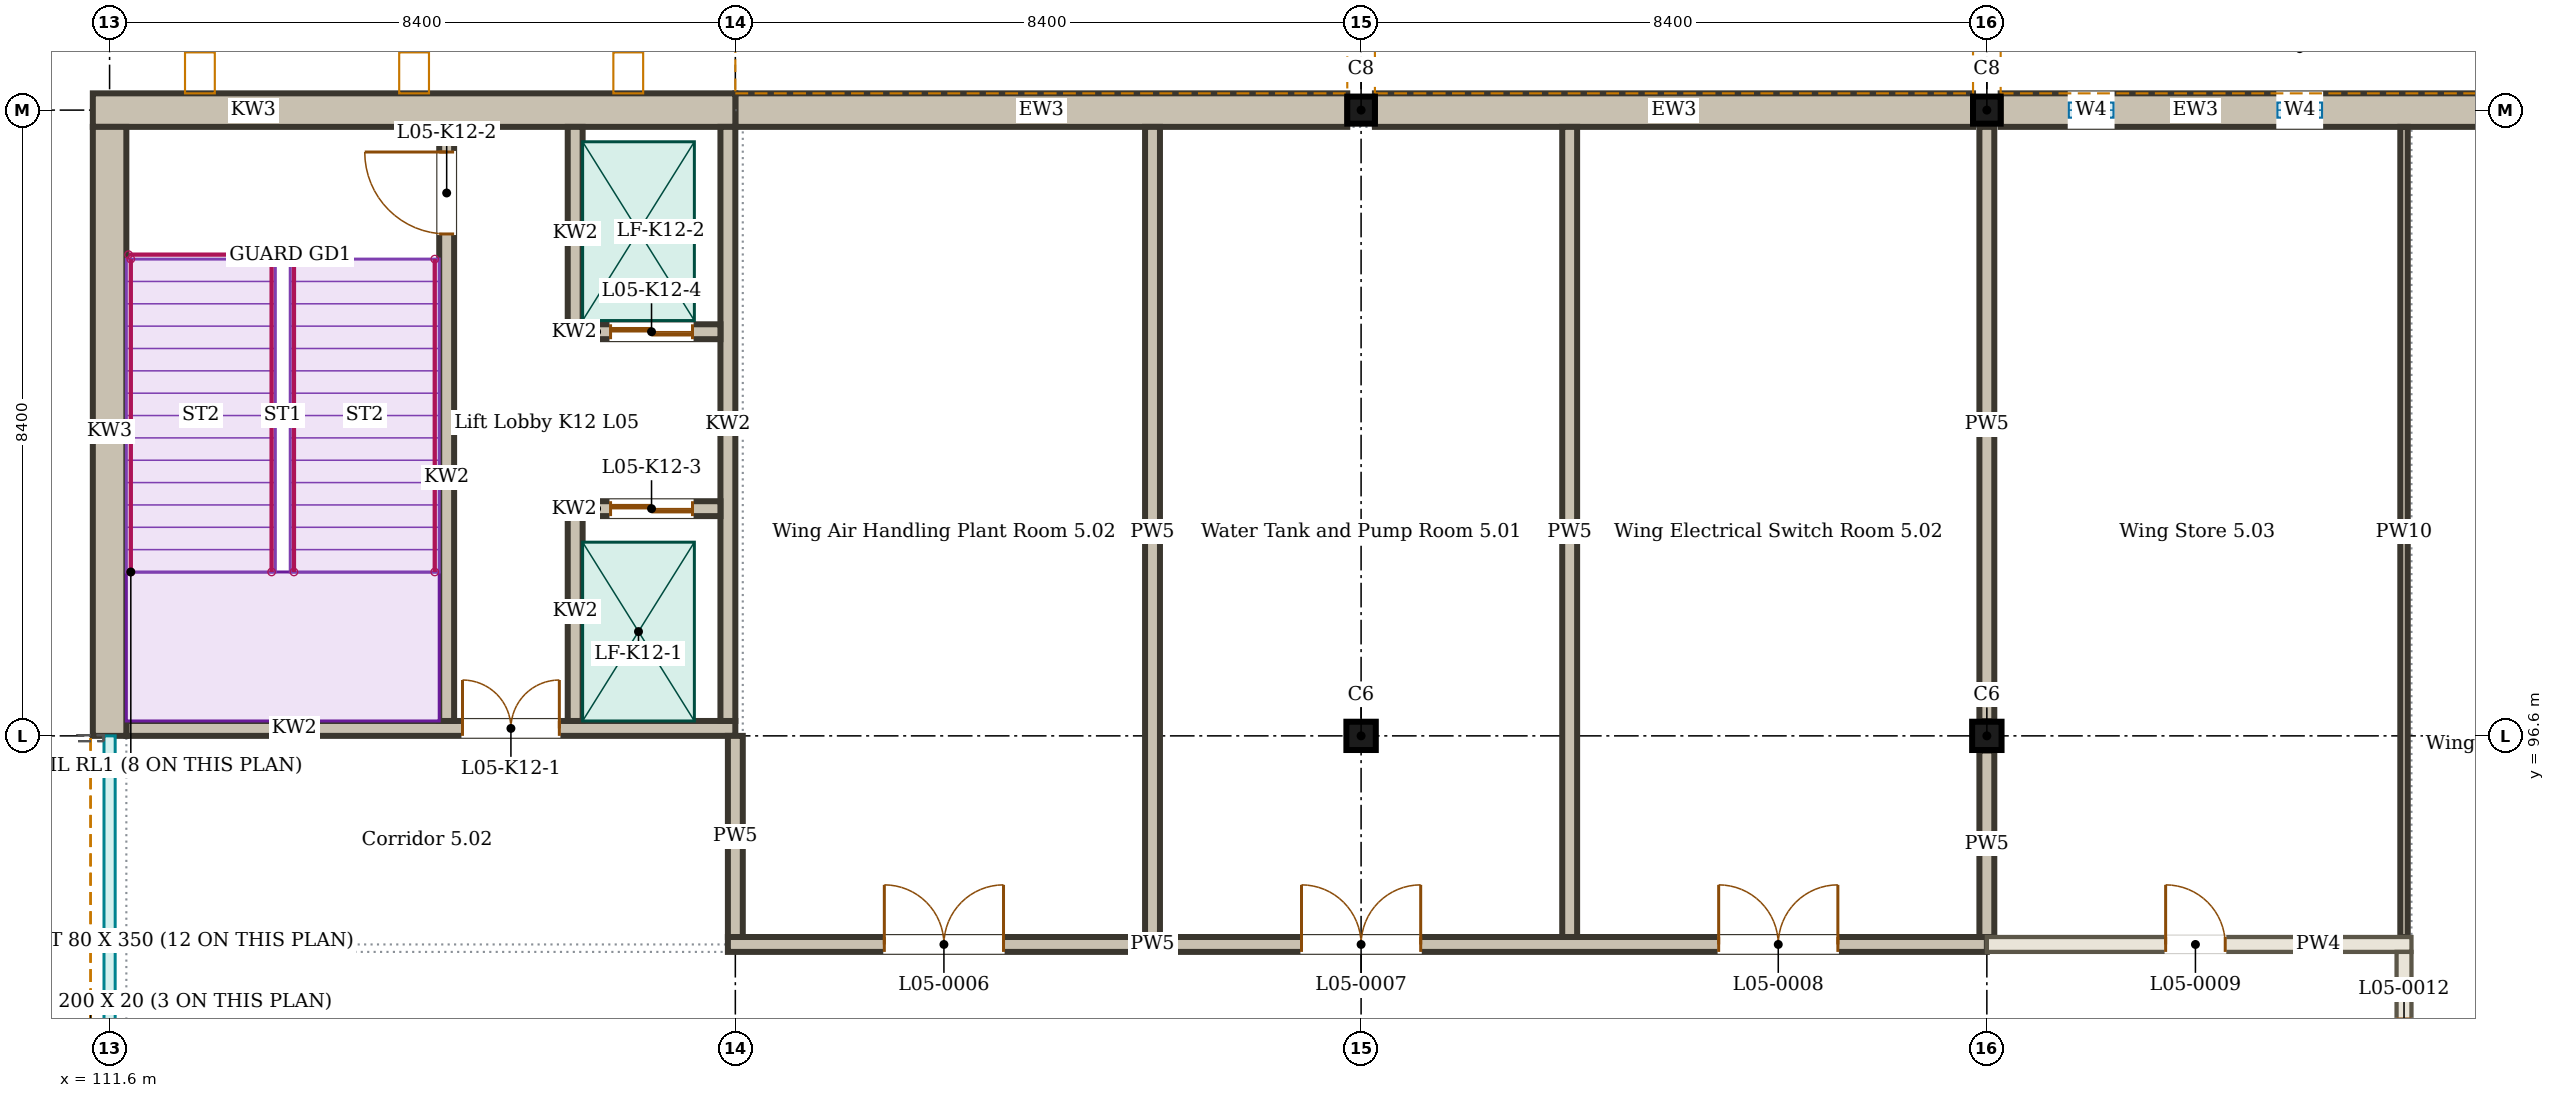
"""IFC4 building model, lengths in metres.
Left out: names, types, materials, properties, quantities, classifications, styles, units other than length and angle.
Written with IfcOpenShell. Run it as: python <this file> out.ifc"""

import sys

from ifc_helpers import new_model, si_unit, direction, frame, frame_2d, origin, origin_2d, place, context, subcontext, project, spatial, rectangle, i_section, extrude, element, fill, save


model = new_model("IFC4")
c1 = context("Model", 3, precision=1e-05, world=origin(), true_north=direction((0.0, 1.0)))
c2 = subcontext(c1, "Body", "Model", "MODEL_VIEW")
j1 = project(units=[si_unit("LENGTHUNIT", "METRE"), si_unit("PLANEANGLEUNIT", "RADIAN")], contexts=[c1])
p1 = place(None, origin())
s1 = spatial("IfcSite", under=j1, at=p1, CompositionType="ELEMENT")
p2 = place(p1, origin())
s2 = spatial("IfcBuilding", under=s1, at=p2, CompositionType="ELEMENT")
p3 = place(p2, frame((0.0, 0.0, 22.5)))
s3 = spatial("IfcBuildingStorey", under=s2, at=p3, CompositionType="ELEMENT", Elevation=22.5)
for number, where, z_axis, x_axis in (
    (1, (128.4, 96.6, 0.0), (0.0, 0.0, 1.0), (1.0, 0.0, 0.0)),
    (2, (136.8, 96.6, 0.0), (0.0, 0.0, 1.0), (1.0, 0.0, 0.0)),
):
    element("IfcColumn", number, at=place(p3, frame(where, z_axis=z_axis, x_axis=x_axis)), inside=s3, PredefinedType="COLUMN", context=c2, shape_type="SweptSolid", body=[
        extrude(i_section(OverallWidth=0.395, OverallDepth=0.38, WebThickness=0.019, FlangeThickness=0.03, FilletRadius=0.027, at=origin_2d()), origin(), (0.0, 0.0, 1.0), 4.5),
    ])
for number, where, z_axis, x_axis in (
    (3, (128.4, 105.0, 0.0), (0.0, 0.0, 1.0), (1.0, 0.0, 0.0)),
    (4, (136.8, 105.0, 0.0), (0.0, 0.0, 1.0), (1.0, 0.0, 0.0)),
):
    element("IfcColumn", number, at=place(p3, frame(where, z_axis=z_axis, x_axis=x_axis)), inside=s3, PredefinedType="COLUMN", context=c2, shape_type="SweptSolid", body=[
        extrude(i_section(OverallWidth=0.371, OverallDepth=0.364, WebThickness=0.013, FlangeThickness=0.022, FilletRadius=0.027, at=origin_2d()), origin(), (0.0, 0.0, 1.0), 4.5),
    ])
p4 = place(p3, frame((120.0, 105.0, 0.0), z_axis=(0.0, 0.0, 1.0), x_axis=(1.0, 0.0, 0.0)))
e5 = element("IfcWall", 5, at=p4, inside=s3, PredefinedType="SOLIDWALL", context=c2, shape_type="SweptSolid", body=[
    extrude(rectangle(XDim=8.215, YDim=0.45, at=frame_2d((4.107, 0.0))), origin(), (0.0, 0.0, 1.0), 3.85),
])
p5 = place(p3, frame((128.585, 105.0, 0.0), z_axis=(0.0, 0.0, 1.0), x_axis=(1.0, 0.0, 0.0)))
e6 = element("IfcWall", 6, at=p5, inside=s3, PredefinedType="SOLIDWALL", context=c2, shape_type="SweptSolid", body=[
    extrude(rectangle(XDim=8.029, YDim=0.45, at=frame_2d((4.015, 0.0))), origin(), (0.0, 0.0, 1.0), 3.85),
])
p6 = place(p3, frame((136.986, 105.0, 0.0), z_axis=(0.0, 0.0, 1.0), x_axis=(1.0, 0.0, 0.0)))
e7 = element("IfcWall", 7, at=p6, inside=s3, PredefinedType="SOLIDWALL", context=c2, shape_type="SweptSolid", body=[
    extrude(rectangle(XDim=8.029, YDim=0.45, at=frame_2d((4.014, 0.0))), origin(), (0.0, 0.0, 1.0), 3.85),
])
p7 = place(p6, frame((0.915, 0.0, 2.1)))
e8 = element("IfcOpeningElement", 8, at=p7, cuts=e7, PredefinedType="OPENING", context=c2, shape_type="SweptSolid", body=[
    extrude(rectangle(XDim=0.6, YDim=1.2, at=frame_2d((0.3, 0.6))), frame((0.0, 0.235, 0.0), z_axis=(0.0, -1.0, 0.0), x_axis=(1.0, 0.0, 0.0)), (0.0, 0.0, 1.0), 0.47),
])
p8 = place(p6, frame((3.715, 0.0, 2.1)))
e9 = element("IfcOpeningElement", 9, at=p8, cuts=e7, PredefinedType="OPENING", context=c2, shape_type="SweptSolid", body=[
    extrude(rectangle(XDim=0.6, YDim=1.2, at=frame_2d((0.3, 0.6))), frame((0.0, 0.235, 0.0), z_axis=(0.0, -1.0, 0.0), x_axis=(1.0, 0.0, 0.0)), (0.0, 0.0, 1.0), 0.47),
])
p9 = place(p6, frame((6.514, 0.0, 2.1)))
e10 = element("IfcOpeningElement", 10, at=p9, cuts=e7, PredefinedType="OPENING", context=c2, shape_type="SweptSolid", body=[
    extrude(rectangle(XDim=0.6, YDim=1.2, at=frame_2d((0.3, 0.6))), frame((0.0, 0.235, 0.0), z_axis=(0.0, -1.0, 0.0), x_axis=(1.0, 0.0, 0.0)), (0.0, 0.0, 1.0), 0.47),
])
p10 = place(p3, frame((119.9, 93.8, 0.0), z_axis=(0.0, 0.0, 1.0), x_axis=(1.0, 0.0, 0.0)))
e11 = element("IfcWall", 11, at=p10, inside=s3, PredefinedType="SOLIDWALL", context=c2, shape_type="SweptSolid", body=[
    extrude(rectangle(XDim=16.9, YDim=0.2, at=frame_2d((8.45, 0.0))), origin(), (0.0, 0.0, 1.0), 3.844),
])
p11 = place(p10, frame((2.1, 0.0, 0.0)))
e12 = element("IfcOpeningElement", 12, at=p11, cuts=e11, PredefinedType="OPENING", context=c2, shape_type="SweptSolid", body=[
    extrude(rectangle(XDim=1.6, YDim=2.1, at=frame_2d((0.8, 1.05))), frame((0.0, 0.11, 0.0), z_axis=(0.0, -1.0, 0.0), x_axis=(1.0, 0.0, 0.0)), (0.0, 0.0, 1.0), 0.22),
])
p12 = place(p10, frame((7.7, 0.0, 0.0)))
e13 = element("IfcOpeningElement", 13, at=p12, cuts=e11, PredefinedType="OPENING", context=c2, shape_type="SweptSolid", body=[
    extrude(rectangle(XDim=1.6, YDim=2.1, at=frame_2d((0.8, 1.05))), frame((0.0, 0.11, 0.0), z_axis=(0.0, -1.0, 0.0), x_axis=(1.0, 0.0, 0.0)), (0.0, 0.0, 1.0), 0.22),
])
p13 = place(p10, frame((13.3, 0.0, 0.0)))
e14 = element("IfcOpeningElement", 14, at=p13, cuts=e11, PredefinedType="OPENING", context=c2, shape_type="SweptSolid", body=[
    extrude(rectangle(XDim=1.6, YDim=2.1, at=frame_2d((0.8, 1.05))), frame((0.0, 0.11, 0.0), z_axis=(0.0, -1.0, 0.0), x_axis=(1.0, 0.0, 0.0)), (0.0, 0.0, 1.0), 0.22),
])
p14 = place(p3, frame((136.8, 93.8, 0.0), z_axis=(0.0, 0.0, 1.0), x_axis=(1.0, 0.0, 0.0)))
e15 = element("IfcWall", 15, at=p14, inside=s3, PredefinedType="PARTITIONING", context=c2, shape_type="SweptSolid", body=[
    extrude(rectangle(XDim=5.7, YDim=0.2, at=frame_2d((2.85, 0.0))), origin(), (0.0, 0.0, 1.0), 3.844),
])
p15 = place(p14, frame((2.4, 0.0, 0.0)))
e16 = element("IfcOpeningElement", 16, at=p15, cuts=e15, PredefinedType="OPENING", context=c2, shape_type="SweptSolid", body=[
    extrude(rectangle(XDim=0.8, YDim=2.1, at=frame_2d((0.4, 1.05))), frame((0.0, 0.11, 0.0), z_axis=(0.0, -1.0, 0.0), x_axis=(1.0, 0.0, 0.0)), (0.0, 0.0, 1.0), 0.22),
])
p16 = place(p3, frame((120.0, 93.9, 0.0), z_axis=(0.0, 0.0, 1.0), x_axis=(0.0, 1.0, 0.0)))
e17 = element("IfcWall", 17, at=p16, inside=s3, PredefinedType="SOLIDWALL", context=c2, shape_type="SweptSolid", body=[
    extrude(rectangle(XDim=2.7, YDim=0.2, at=frame_2d((1.35, 0.0))), origin(), (0.0, 0.0, 1.0), 3.844),
])
for number, where, z_axis, x_axis in (
    (18, (125.6, 93.9, 0.0), (0.0, 0.0, 1.0), (0.0, 1.0, 0.0)),
    (19, (131.2, 93.9, 0.0), (0.0, 0.0, 1.0), (0.0, 1.0, 0.0)),
):
    element("IfcWall", number, at=place(p3, frame(where, z_axis=z_axis, x_axis=x_axis)), inside=s3, PredefinedType="SOLIDWALL", context=c2, shape_type="SweptSolid", body=[
        extrude(rectangle(XDim=10.875, YDim=0.2, at=frame_2d((5.438, 0.0))), origin(), (0.0, 0.0, 1.0), 3.844),
    ])
p17 = place(p3, frame((136.8, 93.9, 0.0), z_axis=(0.0, 0.0, 1.0), x_axis=(0.0, 1.0, 0.0)))
e20 = element("IfcWall", 20, at=p17, inside=s3, PredefinedType="SOLIDWALL", context=c2, shape_type="SweptSolid", body=[
    extrude(rectangle(XDim=2.503, YDim=0.2, at=frame_2d((1.251, 0.0))), origin(), (0.0, 0.0, 1.0), 3.844),
])
p18 = place(p3, frame((136.8, 96.798, 0.0), z_axis=(0.0, 0.0, 1.0), x_axis=(0.0, 1.0, 0.0)))
e21 = element("IfcWall", 21, at=p18, inside=s3, PredefinedType="SOLIDWALL", context=c2, shape_type="SweptSolid", body=[
    extrude(rectangle(XDim=7.977, YDim=0.2, at=frame_2d((3.989, 0.0))), origin(), (0.0, 0.0, 1.0), 3.844),
])
p19 = place(p3, frame((142.4, 91.1, 0.0), z_axis=(0.0, 0.0, 1.0), x_axis=(0.0, 1.0, 0.0)))
e22 = element("IfcWall", 22, at=p19, inside=s3, PredefinedType="PARTITIONING", context=c2, shape_type="SweptSolid", body=[
    extrude(rectangle(XDim=2.6, YDim=0.2, at=frame_2d((1.3, 0.0))), origin(), (0.0, 0.0, 1.0), 3.936),
])
p20 = place(p19, frame((0.9, 0.0, 0.0)))
e23 = element("IfcOpeningElement", 23, at=p20, cuts=e22, PredefinedType="OPENING", context=c2, shape_type="SweptSolid", body=[
    extrude(rectangle(XDim=0.8, YDim=2.1, at=frame_2d((0.4, 1.05))), frame((0.0, 0.11, 0.0), z_axis=(0.0, -1.0, 0.0), x_axis=(1.0, 0.0, 0.0)), (0.0, 0.0, 1.0), 0.22),
])
p21 = place(p3, frame((142.4, 93.9, 0.0), z_axis=(0.0, 0.0, 1.0), x_axis=(0.0, 1.0, 0.0)))
e24 = element("IfcWall", 24, at=p21, inside=s3, PredefinedType="SOLIDWALL", context=c2, shape_type="SweptSolid", body=[
    extrude(rectangle(XDim=10.875, YDim=0.1, at=frame_2d((5.438, 0.0))), origin(), (0.0, 0.0, 1.0), 3.844),
])
p22 = place(p3, frame((111.825, 96.7, 0.0), z_axis=(0.0, 0.0, 1.0), x_axis=(1.0, 0.0, 0.0)))
e25 = element("IfcWall", 25, at=p22, inside=s3, PredefinedType="SOLIDWALL", context=c2, shape_type="SweptSolid", body=[
    extrude(rectangle(XDim=8.175, YDim=0.2, at=frame_2d((4.087, 0.0))), origin(), (0.0, 0.0, 1.0), 4.5),
])
p23 = place(p22, frame((4.512, 0.0, 0.0)))
e26 = element("IfcOpeningElement", 26, at=p23, cuts=e25, PredefinedType="OPENING", context=c2, shape_type="SweptSolid", body=[
    extrude(rectangle(XDim=1.3, YDim=2.1, at=frame_2d((0.65, 1.05))), frame((0.0, 0.11, 0.0), z_axis=(0.0, -1.0, 0.0), x_axis=(1.0, 0.0, 0.0)), (0.0, 0.0, 1.0), 0.22),
])
p24 = place(p3, frame((111.375, 105.0, 0.0), z_axis=(0.0, 0.0, 1.0), x_axis=(1.0, 0.0, 0.0)))
e27 = element("IfcWall", 27, at=p24, inside=s3, PredefinedType="SOLIDWALL", context=c2, shape_type="SweptSolid", body=[
    extrude(rectangle(XDim=8.625, YDim=0.45, at=frame_2d((4.312, 0.0))), origin(), (0.0, 0.0, 1.0), 4.5),
])
p25 = place(p3, frame((111.6, 96.6, 0.0), z_axis=(0.0, 0.0, 1.0), x_axis=(0.0, 1.0, 0.0)))
e28 = element("IfcWall", 28, at=p25, inside=s3, PredefinedType="SOLIDWALL", context=c2, shape_type="SweptSolid", body=[
    extrude(rectangle(XDim=8.175, YDim=0.45, at=frame_2d((4.087, 0.0))), origin(), (0.0, 0.0, 1.0), 4.5),
])
p26 = place(p3, frame((119.9, 96.8, 0.0), z_axis=(0.0, 0.0, 1.0), x_axis=(0.0, 1.0, 0.0)))
e29 = element("IfcWall", 29, at=p26, inside=s3, PredefinedType="SOLIDWALL", context=c2, shape_type="SweptSolid", body=[
    extrude(rectangle(XDim=7.975, YDim=0.2, at=frame_2d((3.987, 0.0))), origin(), (0.0, 0.0, 1.0), 4.5),
])
p27 = place(p3, frame((116.125, 96.8, 0.0), z_axis=(0.0, 0.0, 1.0), x_axis=(0.0, 1.0, 0.0)))
e30 = element("IfcWall", 30, at=p27, inside=s3, PredefinedType="SOLIDWALL", context=c2, shape_type="SweptSolid", body=[
    extrude(rectangle(XDim=7.975, YDim=0.2, at=frame_2d((3.987, 0.0))), origin(), (0.0, 0.0, 1.0), 4.5),
])
p28 = place(p27, frame((6.538, 0.0, 0.0)))
e31 = element("IfcOpeningElement", 31, at=p28, cuts=e30, PredefinedType="OPENING", context=c2, shape_type="SweptSolid", body=[
    extrude(rectangle(XDim=1.1, YDim=2.1, at=frame_2d((0.55, 1.05))), frame((0.0, 0.11, 0.0), z_axis=(0.0, -1.0, 0.0), x_axis=(1.0, 0.0, 0.0)), (0.0, 0.0, 1.0), 0.22),
])
p29 = place(p3, frame((117.85, 96.8, 0.0), z_axis=(0.0, 0.0, 1.0), x_axis=(0.0, 1.0, 0.0)))
e32 = element("IfcWall", 32, at=p29, inside=s3, PredefinedType="SOLIDWALL", context=c2, shape_type="SweptSolid", body=[
    extrude(rectangle(XDim=2.95, YDim=0.2, at=frame_2d((1.475, 0.0))), origin(), (0.0, 0.0, 1.0), 4.5),
])
p30 = place(p3, frame((117.85, 101.925, 0.0), z_axis=(0.0, 0.0, 1.0), x_axis=(0.0, 1.0, 0.0)))
e33 = element("IfcWall", 33, at=p30, inside=s3, PredefinedType="SOLIDWALL", context=c2, shape_type="SweptSolid", body=[
    extrude(rectangle(XDim=2.85, YDim=0.2, at=frame_2d((1.425, 0.0))), origin(), (0.0, 0.0, 1.0), 4.5),
])
p31 = place(p3, frame((117.95, 99.65, 0.0), z_axis=(0.0, 0.0, 1.0), x_axis=(1.0, 0.0, 0.0)))
e34 = element("IfcWall", 34, at=p31, inside=s3, PredefinedType="SOLIDWALL", context=c2, shape_type="SweptSolid", body=[
    extrude(rectangle(XDim=1.85, YDim=0.2, at=frame_2d((0.925, 0.0))), origin(), (0.0, 0.0, 1.0), 4.5),
])
p32 = place(p31, frame((0.375, 0.0, 0.0)))
e35 = element("IfcOpeningElement", 35, at=p32, cuts=e34, PredefinedType="OPENING", context=c2, shape_type="SweptSolid", body=[
    extrude(rectangle(XDim=1.1, YDim=2.1, at=frame_2d((0.55, 1.05))), frame((0.0, 0.11, 0.0), z_axis=(0.0, -1.0, 0.0), x_axis=(1.0, 0.0, 0.0)), (0.0, 0.0, 1.0), 0.22),
])
p33 = place(p3, frame((117.95, 102.025, 0.0), z_axis=(0.0, 0.0, 1.0), x_axis=(1.0, 0.0, 0.0)))
e36 = element("IfcWall", 36, at=p33, inside=s3, PredefinedType="SOLIDWALL", context=c2, shape_type="SweptSolid", body=[
    extrude(rectangle(XDim=1.85, YDim=0.2, at=frame_2d((0.925, 0.0))), origin(), (0.0, 0.0, 1.0), 4.5),
])
p34 = place(p33, frame((0.375, 0.0, 0.0)))
e37 = element("IfcOpeningElement", 37, at=p34, cuts=e36, PredefinedType="OPENING", context=c2, shape_type="SweptSolid", body=[
    extrude(rectangle(XDim=1.1, YDim=2.1, at=frame_2d((0.55, 1.05))), frame((0.0, 0.11, 0.0), z_axis=(0.0, -1.0, 0.0), x_axis=(1.0, 0.0, 0.0)), (0.0, 0.0, 1.0), 0.22),
])
p35 = place(p7, origin())
e38 = element("IfcWindow", 38, at=p35, inside=s3, PartitioningType="SINGLE_PANEL", PredefinedType="WINDOW", context=c2, shape_type="SweptSolid", body=[
    extrude(rectangle(XDim=0.6, YDim=1.2, at=frame_2d((0.3, 0.6))), frame((0.0, -0.075, 0.0), z_axis=(0.0, -1.0, 0.0), x_axis=(1.0, 0.0, 0.0)), (0.0, 0.0, 1.0), 0.06),
])
fill(e8, e38)
p36 = place(p8, origin())
e39 = element("IfcWindow", 39, at=p36, inside=s3, PartitioningType="SINGLE_PANEL", PredefinedType="WINDOW", context=c2, shape_type="SweptSolid", body=[
    extrude(rectangle(XDim=0.6, YDim=1.2, at=frame_2d((0.3, 0.6))), frame((0.0, -0.075, 0.0), z_axis=(0.0, -1.0, 0.0), x_axis=(1.0, 0.0, 0.0)), (0.0, 0.0, 1.0), 0.06),
])
fill(e9, e39)
p37 = place(p11, origin())
e40 = element("IfcDoor", 40, at=p37, inside=s3, OperationType="DOUBLE_DOOR_SINGLE_SWING", PredefinedType="DOOR", context=c2, shape_type="SweptSolid", body=[
    extrude(rectangle(XDim=1.6, YDim=2.1, at=frame_2d((0.8, 1.05))), frame((0.0, 0.025, 0.0), z_axis=(0.0, -1.0, 0.0), x_axis=(1.0, 0.0, 0.0)), (0.0, 0.0, 1.0), 0.05),
])
fill(e12, e40)
p38 = place(p12, origin())
e41 = element("IfcDoor", 41, at=p38, inside=s3, OperationType="DOUBLE_DOOR_SINGLE_SWING", PredefinedType="DOOR", context=c2, shape_type="SweptSolid", body=[
    extrude(rectangle(XDim=1.6, YDim=2.1, at=frame_2d((0.8, 1.05))), frame((0.0, 0.025, 0.0), z_axis=(0.0, -1.0, 0.0), x_axis=(1.0, 0.0, 0.0)), (0.0, 0.0, 1.0), 0.05),
])
fill(e13, e41)
p39 = place(p13, origin())
e42 = element("IfcDoor", 42, at=p39, inside=s3, OperationType="DOUBLE_DOOR_SINGLE_SWING", PredefinedType="DOOR", context=c2, shape_type="SweptSolid", body=[
    extrude(rectangle(XDim=1.6, YDim=2.1, at=frame_2d((0.8, 1.05))), frame((0.0, 0.025, 0.0), z_axis=(0.0, -1.0, 0.0), x_axis=(1.0, 0.0, 0.0)), (0.0, 0.0, 1.0), 0.05),
])
fill(e14, e42)
p40 = place(p15, origin())
e43 = element("IfcDoor", 43, at=p40, inside=s3, OperationType="SINGLE_SWING_LEFT", PredefinedType="DOOR", context=c2, shape_type="SweptSolid", body=[
    extrude(rectangle(XDim=0.8, YDim=2.1, at=frame_2d((0.4, 1.05))), frame((0.0, 0.025, 0.0), z_axis=(0.0, -1.0, 0.0), x_axis=(1.0, 0.0, 0.0)), (0.0, 0.0, 1.0), 0.05),
])
fill(e16, e43)
p41 = place(p23, origin())
e44 = element("IfcDoor", 44, at=p41, inside=s3, OperationType="DOUBLE_DOOR_DOUBLE_SWING", PredefinedType="DOOR", context=c2, shape_type="SweptSolid", body=[
    extrude(rectangle(XDim=1.3, YDim=2.1, at=frame_2d((0.65, 1.05))), frame((0.0, 0.025, 0.0), z_axis=(0.0, -1.0, 0.0), x_axis=(1.0, 0.0, 0.0)), (0.0, 0.0, 1.0), 0.05),
])
fill(e26, e44)
p42 = place(p28, origin())
e45 = element("IfcDoor", 45, at=p42, inside=s3, OperationType="SINGLE_SWING_RIGHT", PredefinedType="DOOR", context=c2, shape_type="SweptSolid", body=[
    extrude(rectangle(XDim=1.1, YDim=2.1, at=frame_2d((0.55, 1.05))), frame((0.0, 0.025, 0.0), z_axis=(0.0, -1.0, 0.0), x_axis=(1.0, 0.0, 0.0)), (0.0, 0.0, 1.0), 0.05),
])
fill(e31, e45)
p43 = place(p32, origin())
e46 = element("IfcDoor", 46, at=p43, inside=s3, OperationType="DOUBLE_DOOR_SLIDING", PredefinedType="DOOR", context=c2, shape_type="SweptSolid", body=[
    extrude(rectangle(XDim=1.1, YDim=2.1, at=frame_2d((0.55, 1.05))), frame((0.0, 0.025, 0.0), z_axis=(0.0, -1.0, 0.0), x_axis=(1.0, 0.0, 0.0)), (0.0, 0.0, 1.0), 0.05),
])
fill(e35, e46)
p44 = place(p34, origin())
e47 = element("IfcDoor", 47, at=p44, inside=s3, OperationType="DOUBLE_DOOR_SLIDING", PredefinedType="DOOR", context=c2, shape_type="SweptSolid", body=[
    extrude(rectangle(XDim=1.1, YDim=2.1, at=frame_2d((0.55, 1.05))), frame((0.0, 0.025, 0.0), z_axis=(0.0, -1.0, 0.0), x_axis=(1.0, 0.0, 0.0)), (0.0, 0.0, 1.0), 0.05),
])
fill(e37, e47)
save(model, sys.argv[1])
